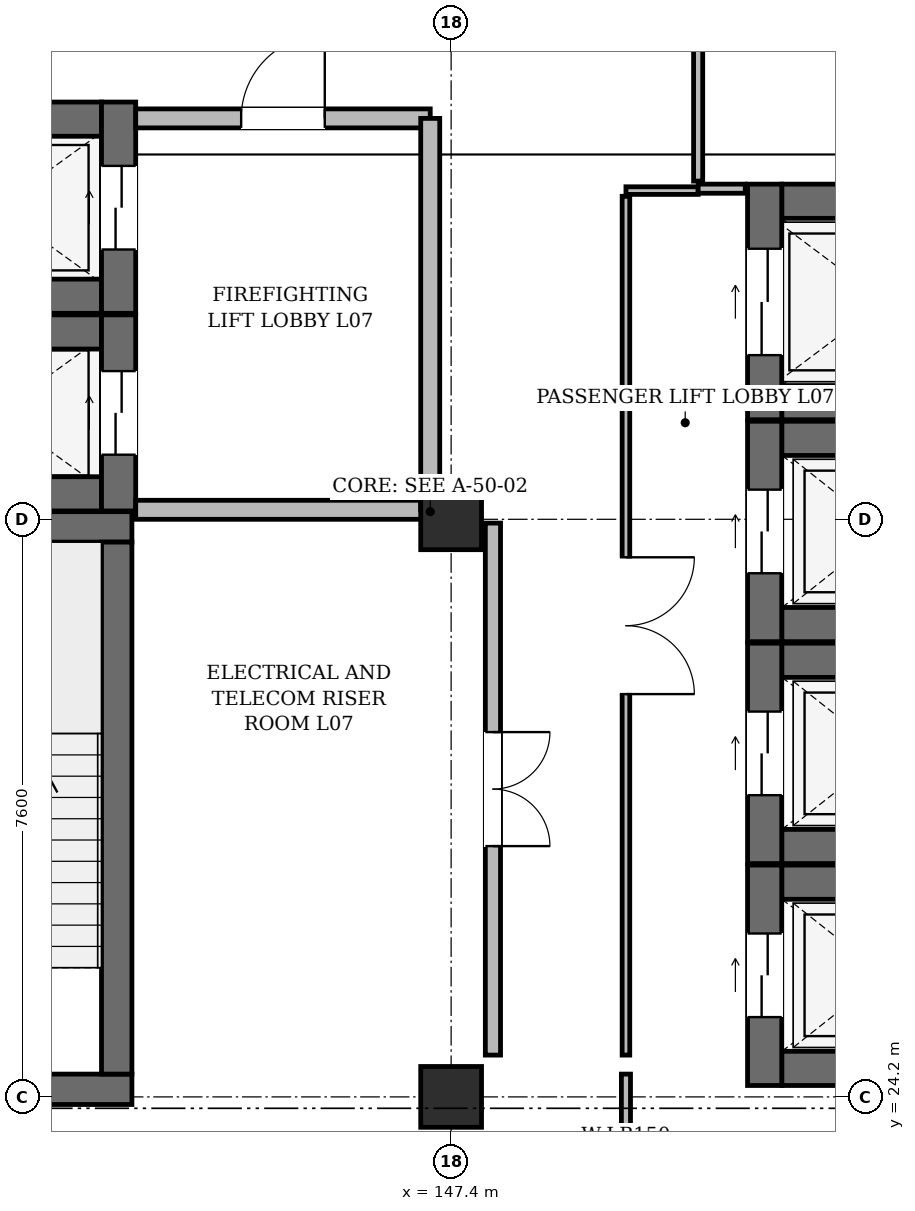
"""IFC4 building model, lengths in metres.
Left out: names, types, materials, properties, quantities, classifications, styles, units other than length and angle.
Written with IfcOpenShell. Run it as: python <this file> out.ifc"""

import sys

from ifc_helpers import new_model, si_unit, direction, frame, frame_2d, origin, origin_2d, place, context, subcontext, project, spatial, rectangle, extrude, element, fill, save


model = new_model("IFC4")
c1 = context("Model", 3, precision=1e-05, world=origin(), true_north=direction((0.0, 1.0)))
c2 = subcontext(c1, "Body", "Model", "MODEL_VIEW")
j1 = project(units=[si_unit("LENGTHUNIT", "METRE"), si_unit("PLANEANGLEUNIT", "RADIAN")], contexts=[c1])
p1 = place(None, origin())
s1 = spatial("IfcSite", under=j1, at=p1, CompositionType="ELEMENT")
p2 = place(p1, origin())
s2 = spatial("IfcBuilding", under=s1, at=p2, CompositionType="ELEMENT")
p3 = place(p2, frame((0.0, 0.0, 32.4)))
s3 = spatial("IfcBuildingStorey", under=s2, at=p3, CompositionType="ELEMENT", Elevation=32.4)
for number, where, z_axis, x_axis in (
    (1, (147.4, 24.2, 0.0), (0.0, 0.0, 1.0), (1.0, 0.0, 0.0)),
    (2, (147.4, 31.8, 0.0), (0.0, 0.0, 1.0), (1.0, 0.0, 0.0)),
):
    element("IfcColumn", number, at=place(p3, frame(where, z_axis=z_axis, x_axis=x_axis)), inside=s3, PredefinedType="COLUMN", context=c2, shape_type="SweptSolid", body=[
        extrude(rectangle(XDim=0.8, YDim=0.8, at=origin_2d()), origin(), (0.0, 0.0, 1.0), 3.89),
    ])
p4 = place(p3, frame((139.4, 24.3, 0.0), z_axis=(0.0, 0.0, 1.0), x_axis=(1.0, 0.0, 0.0)))
e3 = element("IfcWall", 3, at=p4, inside=s3, PredefinedType="SHEAR", context=c2, shape_type="SweptSolid", body=[
    extrude(rectangle(XDim=3.8, YDim=0.4, at=frame_2d((1.9, 0.0))), origin(), (0.0, 0.0, 1.0), 3.89),
])
p5 = place(p4, frame((1.3, 0.0, 0.0)))
e4 = element("IfcOpeningElement", 4, at=p5, cuts=e3, PredefinedType="OPENING", context=c2, shape_type="SweptSolid", body=[
    extrude(rectangle(XDim=1.2, YDim=2.2, at=frame_2d((0.6, 1.1))), frame((0.0, 0.212, 0.0), z_axis=(0.0, -1.0, 0.0), x_axis=(1.0, 0.0, 0.0)), (0.0, 0.0, 1.0), 0.424),
])
p6 = place(p3, frame((139.4, 31.7, 0.0), z_axis=(0.0, 0.0, 1.0), x_axis=(1.0, 0.0, 0.0)))
e5 = element("IfcWall", 5, at=p6, inside=s3, PredefinedType="SHEAR", context=c2, shape_type="SweptSolid", body=[
    extrude(rectangle(XDim=3.8, YDim=0.4, at=frame_2d((1.9, 0.0))), origin(), (0.0, 0.0, 1.0), 3.89),
])
p7 = place(p3, frame((143.0, 24.5, 0.0), z_axis=(0.0, 0.0, 1.0), x_axis=(0.0, 1.0, 0.0)))
e6 = element("IfcWall", 6, at=p7, inside=s3, PredefinedType="SHEAR", context=c2, shape_type="SweptSolid", body=[
    extrude(rectangle(XDim=7.0, YDim=0.4, at=frame_2d((3.5, 0.0))), origin(), (0.0, 0.0, 1.0), 3.89),
])
for number, where, z_axis, x_axis in (
    (7, (140.06, 32.135, 0.0), (0.0, 0.0, 1.0), (1.0, 0.0, 0.0)),
    (8, (140.06, 34.265, 0.0), (0.0, 0.0, 1.0), (1.0, 0.0, 0.0)),
):
    element("IfcWall", number, at=place(p3, frame(where, z_axis=z_axis, x_axis=x_axis)), inside=s3, PredefinedType="SHEAR", context=c2, shape_type="SweptSolid", body=[
        extrude(rectangle(XDim=2.74, YDim=0.45, at=frame_2d((1.37, 0.0))), origin(), (0.0, 0.0, 1.0), 3.89),
    ])
p8 = place(p3, frame((143.025, 31.91, 0.0), z_axis=(0.0, 0.0, 1.0), x_axis=(0.0, 1.0, 0.0)))
e9 = element("IfcWall", 9, at=p8, inside=s3, PredefinedType="SHEAR", context=c2, shape_type="SweptSolid", body=[
    extrude(rectangle(XDim=2.58, YDim=0.45, at=frame_2d((1.29, 0.0))), origin(), (0.0, 0.0, 1.0), 3.89),
])
p9 = place(p8, frame((0.74, 0.0, 0.0)))
e10 = element("IfcOpeningElement", 10, at=p9, cuts=e9, PredefinedType="OPENING", context=c2, shape_type="SweptSolid", body=[
    extrude(rectangle(XDim=1.1, YDim=2.2, at=frame_2d((0.55, 1.1))), frame((0.0, 0.237, 0.0), z_axis=(0.0, -1.0, 0.0), x_axis=(1.0, 0.0, 0.0)), (0.0, 0.0, 1.0), 0.474),
])
for number, where, z_axis, x_axis in (
    (11, (140.06, 34.735, 0.0), (0.0, 0.0, 1.0), (1.0, 0.0, 0.0)),
    (12, (140.06, 37.065, 0.0), (0.0, 0.0, 1.0), (1.0, 0.0, 0.0)),
):
    element("IfcWall", number, at=place(p3, frame(where, z_axis=z_axis, x_axis=x_axis)), inside=s3, PredefinedType="SHEAR", context=c2, shape_type="SweptSolid", body=[
        extrude(rectangle(XDim=2.74, YDim=0.45, at=frame_2d((1.37, 0.0))), origin(), (0.0, 0.0, 1.0), 3.89),
    ])
p10 = place(p3, frame((143.025, 34.51, 0.0), z_axis=(0.0, 0.0, 1.0), x_axis=(0.0, 1.0, 0.0)))
e13 = element("IfcWall", 13, at=p10, inside=s3, PredefinedType="SHEAR", context=c2, shape_type="SweptSolid", body=[
    extrude(rectangle(XDim=2.78, YDim=0.45, at=frame_2d((1.39, 0.0))), origin(), (0.0, 0.0, 1.0), 3.89),
])
p11 = place(p10, frame((0.84, 0.0, 0.0)))
e14 = element("IfcOpeningElement", 14, at=p11, cuts=e13, PredefinedType="OPENING", context=c2, shape_type="SweptSolid", body=[
    extrude(rectangle(XDim=1.1, YDim=2.2, at=frame_2d((0.55, 1.1))), frame((0.0, 0.237, 0.0), z_axis=(0.0, -1.0, 0.0), x_axis=(1.0, 0.0, 0.0)), (0.0, 0.0, 1.0), 0.474),
])
for number, where, z_axis, x_axis in (
    (15, (151.75, 24.575, 0.0), (0.0, 0.0, 1.0), (1.0, 0.0, 0.0)),
    (16, (151.75, 27.025, 0.0), (0.0, 0.0, 1.0), (1.0, 0.0, 0.0)),
):
    element("IfcWall", number, at=place(p3, frame(where, z_axis=z_axis, x_axis=x_axis)), inside=s3, PredefinedType="SHEAR", context=c2, shape_type="SweptSolid", body=[
        extrude(rectangle(XDim=2.7, YDim=0.45, at=frame_2d((1.35, 0.0))), origin(), (0.0, 0.0, 1.0), 3.89),
    ])
p12 = place(p3, frame((151.525, 24.35, 0.0), z_axis=(0.0, 0.0, 1.0), x_axis=(0.0, 1.0, 0.0)))
e17 = element("IfcWall", 17, at=p12, inside=s3, PredefinedType="SHEAR", context=c2, shape_type="SweptSolid", body=[
    extrude(rectangle(XDim=2.9, YDim=0.45, at=frame_2d((1.45, 0.0))), origin(), (0.0, 0.0, 1.0), 3.89),
])
p13 = place(p12, frame((0.9, 0.0, 0.0)))
e18 = element("IfcOpeningElement", 18, at=p13, cuts=e17, PredefinedType="OPENING", context=c2, shape_type="SweptSolid", body=[
    extrude(rectangle(XDim=1.1, YDim=2.2, at=frame_2d((0.55, 1.1))), frame((0.0, 0.237, 0.0), z_axis=(0.0, -1.0, 0.0), x_axis=(1.0, 0.0, 0.0)), (0.0, 0.0, 1.0), 0.474),
])
for number, where, z_axis, x_axis in (
    (19, (151.75, 27.495, 0.0), (0.0, 0.0, 1.0), (1.0, 0.0, 0.0)),
    (20, (151.75, 29.945, 0.0), (0.0, 0.0, 1.0), (1.0, 0.0, 0.0)),
):
    element("IfcWall", number, at=place(p3, frame(where, z_axis=z_axis, x_axis=x_axis)), inside=s3, PredefinedType="SHEAR", context=c2, shape_type="SweptSolid", body=[
        extrude(rectangle(XDim=2.7, YDim=0.45, at=frame_2d((1.35, 0.0))), origin(), (0.0, 0.0, 1.0), 3.89),
    ])
p14 = place(p3, frame((151.525, 27.27, 0.0), z_axis=(0.0, 0.0, 1.0), x_axis=(0.0, 1.0, 0.0)))
e21 = element("IfcWall", 21, at=p14, inside=s3, PredefinedType="SHEAR", context=c2, shape_type="SweptSolid", body=[
    extrude(rectangle(XDim=2.9, YDim=0.45, at=frame_2d((1.45, 0.0))), origin(), (0.0, 0.0, 1.0), 3.89),
])
p15 = place(p14, frame((0.9, 0.0, 0.0)))
e22 = element("IfcOpeningElement", 22, at=p15, cuts=e21, PredefinedType="OPENING", context=c2, shape_type="SweptSolid", body=[
    extrude(rectangle(XDim=1.1, YDim=2.2, at=frame_2d((0.55, 1.1))), frame((0.0, 0.237, 0.0), z_axis=(0.0, -1.0, 0.0), x_axis=(1.0, 0.0, 0.0)), (0.0, 0.0, 1.0), 0.474),
])
for number, where, z_axis, x_axis in (
    (23, (151.75, 30.415, 0.0), (0.0, 0.0, 1.0), (1.0, 0.0, 0.0)),
    (24, (151.75, 32.865, 0.0), (0.0, 0.0, 1.0), (1.0, 0.0, 0.0)),
):
    element("IfcWall", number, at=place(p3, frame(where, z_axis=z_axis, x_axis=x_axis)), inside=s3, PredefinedType="SHEAR", context=c2, shape_type="SweptSolid", body=[
        extrude(rectangle(XDim=2.7, YDim=0.45, at=frame_2d((1.35, 0.0))), origin(), (0.0, 0.0, 1.0), 3.89),
    ])
p16 = place(p3, frame((151.525, 30.19, 0.0), z_axis=(0.0, 0.0, 1.0), x_axis=(0.0, 1.0, 0.0)))
e25 = element("IfcWall", 25, at=p16, inside=s3, PredefinedType="SHEAR", context=c2, shape_type="SweptSolid", body=[
    extrude(rectangle(XDim=2.9, YDim=0.45, at=frame_2d((1.45, 0.0))), origin(), (0.0, 0.0, 1.0), 3.89),
])
p17 = place(p16, frame((0.9, 0.0, 0.0)))
e26 = element("IfcOpeningElement", 26, at=p17, cuts=e25, PredefinedType="OPENING", context=c2, shape_type="SweptSolid", body=[
    extrude(rectangle(XDim=1.1, YDim=2.2, at=frame_2d((0.55, 1.1))), frame((0.0, 0.237, 0.0), z_axis=(0.0, -1.0, 0.0), x_axis=(1.0, 0.0, 0.0)), (0.0, 0.0, 1.0), 0.474),
])
for number, where, z_axis, x_axis in (
    (27, (151.75, 33.335, 0.0), (0.0, 0.0, 1.0), (1.0, 0.0, 0.0)),
    (28, (151.75, 35.985, 0.0), (0.0, 0.0, 1.0), (1.0, 0.0, 0.0)),
):
    element("IfcWall", number, at=place(p3, frame(where, z_axis=z_axis, x_axis=x_axis)), inside=s3, PredefinedType="SHEAR", context=c2, shape_type="SweptSolid", body=[
        extrude(rectangle(XDim=2.7, YDim=0.45, at=frame_2d((1.35, 0.0))), origin(), (0.0, 0.0, 1.0), 3.89),
    ])
p18 = place(p3, frame((151.525, 33.11, 0.0), z_axis=(0.0, 0.0, 1.0), x_axis=(0.0, 1.0, 0.0)))
e29 = element("IfcWall", 29, at=p18, inside=s3, PredefinedType="SHEAR", context=c2, shape_type="SweptSolid", body=[
    extrude(rectangle(XDim=3.1, YDim=0.45, at=frame_2d((1.55, 0.0))), origin(), (0.0, 0.0, 1.0), 3.89),
])
p19 = place(p18, frame((0.85, 0.0, 0.0)))
e30 = element("IfcOpeningElement", 30, at=p19, cuts=e29, PredefinedType="OPENING", context=c2, shape_type="SweptSolid", body=[
    extrude(rectangle(XDim=1.4, YDim=2.3, at=frame_2d((0.7, 1.15))), frame((0.0, 0.237, 0.0), z_axis=(0.0, -1.0, 0.0), x_axis=(1.0, 0.0, 0.0)), (0.0, 0.0, 1.0), 0.474),
])
p20 = place(p3, frame((143.25, 37.075, 0.0), z_axis=(0.0, 0.0, 1.0), x_axis=(1.0, 0.0, 0.0)))
e31 = element("IfcWall", 31, at=p20, inside=s3, PredefinedType="SOLIDWALL", context=c2, shape_type="SweptSolid", body=[
    extrude(rectangle(XDim=3.875, YDim=0.25, at=frame_2d((1.938, 0.0))), origin(), (0.0, 0.0, 1.0), 3.805),
])
p21 = place(p20, frame((1.387, 0.0, 0.0)))
e32 = element("IfcOpeningElement", 32, at=p21, cuts=e31, PredefinedType="OPENING", context=c2, shape_type="SweptSolid", body=[
    extrude(rectangle(XDim=1.1, YDim=2.2, at=frame_2d((0.55, 1.1))), frame((0.0, 0.137, 0.0), z_axis=(0.0, -1.0, 0.0), x_axis=(1.0, 0.0, 0.0)), (0.0, 0.0, 1.0), 0.274),
])
p22 = place(p3, frame((143.25, 31.925, 0.0), z_axis=(0.0, 0.0, 1.0), x_axis=(1.0, 0.0, 0.0)))
e33 = element("IfcWall", 33, at=p22, inside=s3, PredefinedType="SOLIDWALL", context=c2, shape_type="SweptSolid", body=[
    extrude(rectangle(XDim=3.875, YDim=0.25, at=frame_2d((1.938, 0.0))), origin(), (0.0, 0.0, 1.0), 3.225),
])
p23 = place(p3, frame((147.125, 31.925, 0.0), z_axis=(0.0, 0.0, 1.0), x_axis=(0.0, 1.0, 0.0)))
e34 = element("IfcWall", 34, at=p23, inside=s3, PredefinedType="SOLIDWALL", context=c2, shape_type="SweptSolid", body=[
    extrude(rectangle(XDim=5.15, YDim=0.25, at=frame_2d((2.575, 0.0))), origin(), (0.0, 0.0, 1.0), 3.225),
])
p24 = place(p3, frame((147.95, 31.75, 0.0), z_axis=(0.0, 0.0, 1.0), x_axis=(0.0, -1.0, 0.0)))
e35 = element("IfcWall", 35, at=p24, inside=s3, PredefinedType="PARTITIONING", context=c2, shape_type="SweptSolid", body=[
    extrude(rectangle(XDim=7.0, YDim=0.2, at=frame_2d((3.5, 0.0))), origin(), (0.0, 0.0, 1.0), 3.805),
])
p25 = place(p24, frame((2.75, 0.0, 0.0)))
e36 = element("IfcOpeningElement", 36, at=p25, cuts=e35, PredefinedType="OPENING", context=c2, shape_type="SweptSolid", body=[
    extrude(rectangle(XDim=1.5, YDim=2.2, at=frame_2d((0.75, 1.1))), frame((0.0, 0.112, 0.0), z_axis=(0.0, -1.0, 0.0), x_axis=(1.0, 0.0, 0.0)), (0.0, 0.0, 1.0), 0.224),
])
p26 = place(p3, frame((149.7, 24.75, 0.0), z_axis=(0.0, 0.0, 1.0), x_axis=(0.0, 1.0, 0.0)))
e37 = element("IfcWall", 37, at=p26, inside=s3, PredefinedType="PARTITIONING", context=c2, shape_type="SweptSolid", body=[
    extrude(rectangle(XDim=11.3, YDim=0.1, at=frame_2d((5.65, 0.0))), origin(), (0.0, 0.0, 1.0), 3.805),
])
p27 = place(p26, frame((4.75, 0.0, 0.0)))
e38 = element("IfcOpeningElement", 38, at=p27, cuts=e37, PredefinedType="OPENING", context=c2, shape_type="SweptSolid", body=[
    extrude(rectangle(XDim=1.8, YDim=2.4, at=frame_2d((0.9, 1.2))), frame((0.0, 0.062, 0.0), z_axis=(0.0, -1.0, 0.0), x_axis=(1.0, 0.0, 0.0)), (0.0, 0.0, 1.0), 0.124),
])
p28 = place(p3, frame((149.7, 36.125, 0.0), z_axis=(0.0, 0.0, 1.0), x_axis=(1.0, 0.0, 0.0)))
e39 = element("IfcWall", 39, at=p28, inside=s3, PredefinedType="PARTITIONING", context=c2, shape_type="SweptSolid", body=[
    extrude(rectangle(XDim=0.95, YDim=0.1, at=frame_2d((0.475, 0.0))), origin(), (0.0, 0.0, 1.0), 3.805),
])
p29 = place(p3, frame((150.65, 36.15, 0.0), z_axis=(0.0, 0.0, 1.0), x_axis=(1.0, 0.0, 0.0)))
e40 = element("IfcWall", 40, at=p29, inside=s3, PredefinedType="PARTITIONING", context=c2, shape_type="SweptSolid", body=[
    extrude(rectangle(XDim=0.62, YDim=0.12, at=frame_2d((0.31, 0.0))), origin(), (0.0, 0.0, 1.0), 3.805),
])
p30 = place(p3, frame((149.7, 24.5, 0.0), z_axis=(0.0, 0.0, 1.0), x_axis=(0.0, -1.0, 0.0)))
e41 = element("IfcWall", 41, at=p30, inside=s3, PredefinedType="PARTITIONING", context=c2, shape_type="SweptSolid", body=[
    extrude(rectangle(XDim=0.8, YDim=0.12, at=frame_2d((0.4, 0.0))), origin(), (0.0, 0.0, 1.0), 3.805),
])
p31 = place(p3, frame((150.65, 44.34, 0.0), z_axis=(0.0, 0.0, 1.0), x_axis=(0.0, -1.0, 0.0)))
e42 = element("IfcWall", 42, at=p31, inside=s3, PredefinedType="PARTITIONING", context=c2, shape_type="SweptSolid", body=[
    extrude(rectangle(XDim=8.09, YDim=0.12, at=frame_2d((4.045, 0.0))), origin(), (0.0, 0.0, 1.0), 3.805),
])
p32 = place(p31, frame((3.57, 0.0, 0.0)))
e43 = element("IfcOpeningElement", 43, at=p32, cuts=e42, PredefinedType="OPENING", context=c2, shape_type="SweptSolid", body=[
    extrude(rectangle(XDim=0.95, YDim=2.2, at=frame_2d((0.475, 1.1))), frame((0.0, 0.072, 0.0), z_axis=(0.0, -1.0, 0.0), x_axis=(1.0, 0.0, 0.0)), (0.0, 0.0, 1.0), 0.144),
])
p33 = place(p9, origin())
e44 = element("IfcDoor", 44, at=p33, inside=s3, OperationType="DOUBLE_DOOR_SLIDING", PredefinedType="DOOR", context=c2, shape_type="SweptSolid", body=[
    extrude(rectangle(XDim=1.1, YDim=2.2, at=frame_2d((0.55, 1.1))), frame((0.0, 0.025, 0.0), z_axis=(0.0, -1.0, 0.0), x_axis=(1.0, 0.0, 0.0)), (0.0, 0.0, 1.0), 0.05),
])
fill(e10, e44)
p34 = place(p11, origin())
e45 = element("IfcDoor", 45, at=p34, inside=s3, OperationType="DOUBLE_DOOR_SLIDING", PredefinedType="DOOR", context=c2, shape_type="SweptSolid", body=[
    extrude(rectangle(XDim=1.1, YDim=2.2, at=frame_2d((0.55, 1.1))), frame((0.0, 0.025, 0.0), z_axis=(0.0, -1.0, 0.0), x_axis=(1.0, 0.0, 0.0)), (0.0, 0.0, 1.0), 0.05),
])
fill(e14, e45)
p35 = place(p13, origin())
e46 = element("IfcDoor", 46, at=p35, inside=s3, OperationType="DOUBLE_DOOR_SLIDING", PredefinedType="DOOR", context=c2, shape_type="SweptSolid", body=[
    extrude(rectangle(XDim=1.1, YDim=2.2, at=frame_2d((0.55, 1.1))), frame((0.0, 0.025, 0.0), z_axis=(0.0, -1.0, 0.0), x_axis=(1.0, 0.0, 0.0)), (0.0, 0.0, 1.0), 0.05),
])
fill(e18, e46)
p36 = place(p15, origin())
e47 = element("IfcDoor", 47, at=p36, inside=s3, OperationType="DOUBLE_DOOR_SLIDING", PredefinedType="DOOR", context=c2, shape_type="SweptSolid", body=[
    extrude(rectangle(XDim=1.1, YDim=2.2, at=frame_2d((0.55, 1.1))), frame((0.0, 0.025, 0.0), z_axis=(0.0, -1.0, 0.0), x_axis=(1.0, 0.0, 0.0)), (0.0, 0.0, 1.0), 0.05),
])
fill(e22, e47)
p37 = place(p17, origin())
e48 = element("IfcDoor", 48, at=p37, inside=s3, OperationType="DOUBLE_DOOR_SLIDING", PredefinedType="DOOR", context=c2, shape_type="SweptSolid", body=[
    extrude(rectangle(XDim=1.1, YDim=2.2, at=frame_2d((0.55, 1.1))), frame((0.0, 0.025, 0.0), z_axis=(0.0, -1.0, 0.0), x_axis=(1.0, 0.0, 0.0)), (0.0, 0.0, 1.0), 0.05),
])
fill(e26, e48)
p38 = place(p19, origin())
e49 = element("IfcDoor", 49, at=p38, inside=s3, OperationType="DOUBLE_DOOR_SLIDING", PredefinedType="DOOR", context=c2, shape_type="SweptSolid", body=[
    extrude(rectangle(XDim=1.4, YDim=2.3, at=frame_2d((0.7, 1.15))), frame((0.0, 0.025, 0.0), z_axis=(0.0, -1.0, 0.0), x_axis=(1.0, 0.0, 0.0)), (0.0, 0.0, 1.0), 0.05),
])
fill(e30, e49)
p39 = place(p21, origin())
e50 = element("IfcDoor", 50, at=p39, inside=s3, OperationType="SINGLE_SWING_RIGHT", PredefinedType="DOOR", context=c2, shape_type="SweptSolid", body=[
    extrude(rectangle(XDim=1.1, YDim=2.2, at=frame_2d((0.55, 1.1))), frame((0.0, 0.025, 0.0), z_axis=(0.0, -1.0, 0.0), x_axis=(1.0, 0.0, 0.0)), (0.0, 0.0, 1.0), 0.05),
])
fill(e32, e50)
p40 = place(p25, origin())
e51 = element("IfcDoor", 51, at=p40, inside=s3, OperationType="DOUBLE_DOOR_SINGLE_SWING", PredefinedType="DOOR", context=c2, shape_type="SweptSolid", body=[
    extrude(rectangle(XDim=1.5, YDim=2.2, at=frame_2d((0.75, 1.1))), frame((0.0, 0.025, 0.0), z_axis=(0.0, -1.0, 0.0), x_axis=(1.0, 0.0, 0.0)), (0.0, 0.0, 1.0), 0.05),
])
fill(e36, e51)
p41 = place(p27, frame((1.8, 0.0, 0.0), z_axis=(0.0, 0.0, 1.0), x_axis=(-1.0, 0.0, 0.0)))
e52 = element("IfcDoor", 52, at=p41, inside=s3, OperationType="DOUBLE_DOOR_SINGLE_SWING", PredefinedType="DOOR", context=c2, shape_type="SweptSolid", body=[
    extrude(rectangle(XDim=1.8, YDim=2.4, at=frame_2d((0.9, 1.2))), frame((0.0, 0.025, 0.0), z_axis=(0.0, -1.0, 0.0), x_axis=(1.0, 0.0, 0.0)), (0.0, 0.0, 1.0), 0.05),
])
fill(e38, e52)
save(model, sys.argv[1])
